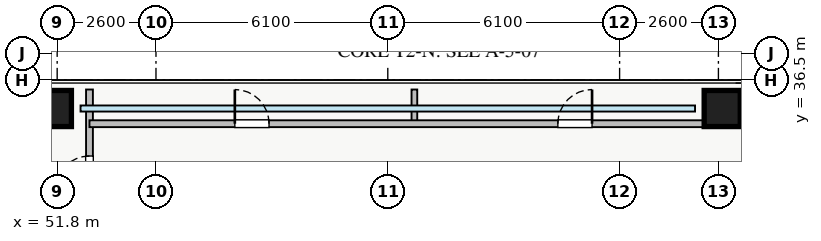
"""IFC4 building model, lengths in metres.
Left out: names, types, materials, properties, quantities, classifications, styles, units other than length and angle.
Written with IfcOpenShell. Run it as: python <this file> out.ifc"""

import sys

from ifc_helpers import new_model, si_unit, direction, frame, frame_2d, origin, origin_2d, place, context, subcontext, project, spatial, rectangle, extrude, source, transform, mapped, element, fill, save


model = new_model("IFC4")
c1 = context("Model", 3, precision=1e-05, world=origin(), true_north=direction((0.0, 1.0)))
c2 = subcontext(c1, "Body", "Model", "MODEL_VIEW")
j1 = project(units=[si_unit("LENGTHUNIT", "METRE"), si_unit("PLANEANGLEUNIT", "RADIAN")], contexts=[c1])
p1 = place(None, origin())
s1 = spatial("IfcSite", under=j1, at=p1, CompositionType="ELEMENT")
p2 = place(p1, origin())
s2 = spatial("IfcBuilding", under=s1, at=p2, CompositionType="ELEMENT")
p3 = place(p2, frame((0.0, 0.0, 53.5)))
s3 = spatial("IfcBuildingStorey", under=s2, at=p3, CompositionType="ELEMENT", Elevation=53.5)
m1 = source(origin(), c2, "Body", "SweptSolid", [
    extrude(rectangle(XDim=0.95, YDim=0.95, at=origin_2d()), origin(), (0.0, 0.0, 1.0), 3.25),
])
for number, where, z_axis, x_axis in (
    (1, (69.3, 35.75, 0.0), (0.0, 0.0, 1.0), (1.0, 0.0, 0.0)),
    (2, (51.7, 35.75, 0.0), (0.0, 0.0, 1.0), (1.0, 0.0, 0.0)),
):
    element("IfcColumn", number, at=place(p3, frame(where, z_axis=z_axis, x_axis=x_axis)), inside=s3, PredefinedType="COLUMN", context=c2, shape_type="MappedRepresentation", body=[
        mapped(m1, transform((0.0, 0.0, 0.0), x_axis=(1.0, 0.0, 0.0), y_axis=(0.0, 1.0, 0.0), z_axis=(0.0, 0.0, 1.0), scale=1.0)),
    ])
p4 = place(p3, frame((52.65, 9.75, 0.0), z_axis=(0.0, 0.0, 1.0), x_axis=(0.0, 1.0, 0.0)))
e3 = element("IfcWall", 3, at=p4, inside=s3, PredefinedType="PARTITIONING", context=c2, shape_type="SweptSolid", body=[
    extrude(rectangle(XDim=26.5, YDim=0.18, at=frame_2d((13.25, 0.0))), origin(), (0.0, 0.0, 1.0), 3.07),
])
p5 = place(p4, frame((23.85, 0.0, 0.0)))
e4 = element("IfcOpeningElement", 4, at=p5, cuts=e3, PredefinedType="OPENING", context=c2, shape_type="SweptSolid", body=[
    extrude(rectangle(XDim=0.9, YDim=2.05, at=frame_2d((0.45, 1.025))), frame((0.0, 0.1, 0.0), z_axis=(0.0, -1.0, 0.0), x_axis=(1.0, 0.0, 0.0)), (0.0, 0.0, 1.0), 0.2),
])
p6 = place(p4, frame((1.75, 0.0, 0.0)))
e5 = element("IfcOpeningElement", 5, at=p6, cuts=e3, PredefinedType="OPENING", context=c2, shape_type="SweptSolid", body=[
    extrude(rectangle(XDim=0.9, YDim=2.05, at=frame_2d((0.45, 1.025))), frame((0.0, 0.1, 0.0), z_axis=(0.0, -1.0, 0.0), x_axis=(1.0, 0.0, 0.0)), (0.0, 0.0, 1.0), 0.2),
])
p7 = place(p4, frame((5.145, 0.0, 0.0)))
e6 = element("IfcOpeningElement", 6, at=p7, cuts=e3, PredefinedType="OPENING", context=c2, shape_type="SweptSolid", body=[
    extrude(rectangle(XDim=1.0, YDim=2.05, at=frame_2d((0.5, 1.025))), frame((0.0, 0.1, 0.0), z_axis=(0.0, -1.0, 0.0), x_axis=(1.0, 0.0, 0.0)), (0.0, 0.0, 1.0), 0.2),
])
p8 = place(p4, frame((14.39, 0.0, 0.0)))
e7 = element("IfcOpeningElement", 7, at=p8, cuts=e3, PredefinedType="OPENING", context=c2, shape_type="SweptSolid", body=[
    extrude(rectangle(XDim=1.0, YDim=2.05, at=frame_2d((0.5, 1.025))), frame((0.0, 0.1, 0.0), z_axis=(0.0, -1.0, 0.0), x_axis=(1.0, 0.0, 0.0)), (0.0, 0.0, 1.0), 0.2),
])
for number, where, z_axis, x_axis in (
    (8, (61.2, 35.35, 0.0), (0.0, 0.0, 1.0), (0.0, 1.0, 0.0)),
    (9, (69.65, 35.35, 0.0), (0.0, 0.0, 1.0), (0.0, 1.0, 0.0)),
):
    element("IfcWall", number, at=place(p3, frame(where, z_axis=z_axis, x_axis=x_axis)), inside=s3, PredefinedType="PARTITIONING", context=c2, shape_type="SweptSolid", body=[
        extrude(rectangle(XDim=0.9, YDim=0.15, at=frame_2d((0.45, 0.0))), origin(), (0.0, 0.0, 1.0), 3.07),
    ])
p9 = place(p3, frame((52.65, 35.35, 0.0), z_axis=(0.0, 0.0, 1.0), x_axis=(1.0, 0.0, 0.0)))
e10 = element("IfcWall", 10, at=p9, inside=s3, PredefinedType="PARTITIONING", context=c2, shape_type="SweptSolid", body=[
    extrude(rectangle(XDim=17.0, YDim=0.18, at=frame_2d((8.5, 0.0))), origin(), (0.0, 0.0, 1.0), 3.07),
])
p10 = place(p9, frame((3.825, 0.0, 0.0)))
e11 = element("IfcOpeningElement", 11, at=p10, cuts=e10, PredefinedType="OPENING", context=c2, shape_type="SweptSolid", body=[
    extrude(rectangle(XDim=0.9, YDim=2.05, at=frame_2d((0.45, 1.025))), frame((0.0, 0.1, 0.0), z_axis=(0.0, -1.0, 0.0), x_axis=(1.0, 0.0, 0.0)), (0.0, 0.0, 1.0), 0.2),
])
p11 = place(p9, frame((12.325, 0.0, 0.0)))
e12 = element("IfcOpeningElement", 12, at=p11, cuts=e10, PredefinedType="OPENING", context=c2, shape_type="SweptSolid", body=[
    extrude(rectangle(XDim=0.9, YDim=2.05, at=frame_2d((0.45, 1.025))), frame((0.0, 0.1, 0.0), z_axis=(0.0, -1.0, 0.0), x_axis=(1.0, 0.0, 0.0)), (0.0, 0.0, 1.0), 0.2),
])
m2 = source(origin(), c2, "Body", "SweptSolid", [
    extrude(rectangle(XDim=0.9, YDim=2.05, at=frame_2d((0.45, 1.025))), frame((0.0, 0.025, 0.0), z_axis=(0.0, -1.0, 0.0), x_axis=(1.0, 0.0, 0.0)), (0.0, 0.0, 1.0), 0.05),
])
p12 = place(p5, origin())
e13 = element("IfcDoor", 13, at=p12, inside=s3, OperationType="SINGLE_SWING_LEFT", PredefinedType="DOOR", context=c2, shape_type="MappedRepresentation", body=[
    mapped(m2, transform((0.0, 0.0, 0.0), x_axis=(1.0, 0.0, 0.0), y_axis=(0.0, 1.0, 0.0), z_axis=(0.0, 0.0, 1.0), scale=1.0)),
])
fill(e4, e13)
p13 = place(p10, origin())
e14 = element("IfcDoor", 14, at=p13, inside=s3, OperationType="SINGLE_SWING_LEFT", PredefinedType="DOOR", context=c2, shape_type="MappedRepresentation", body=[
    mapped(m2, transform((0.0, 0.0, 0.0), x_axis=(1.0, 0.0, 0.0), y_axis=(0.0, 1.0, 0.0), z_axis=(0.0, 0.0, 1.0), scale=1.0)),
])
fill(e11, e14)
p14 = place(p11, origin())
e15 = element("IfcDoor", 15, at=p14, inside=s3, OperationType="SINGLE_SWING_RIGHT", PredefinedType="DOOR", context=c2, shape_type="MappedRepresentation", body=[
    mapped(m2, transform((0.0, 0.0, 0.0), x_axis=(1.0, 0.0, 0.0), y_axis=(0.0, 1.0, 0.0), z_axis=(0.0, 0.0, 1.0), scale=1.0)),
])
fill(e12, e15)
save(model, sys.argv[1])
